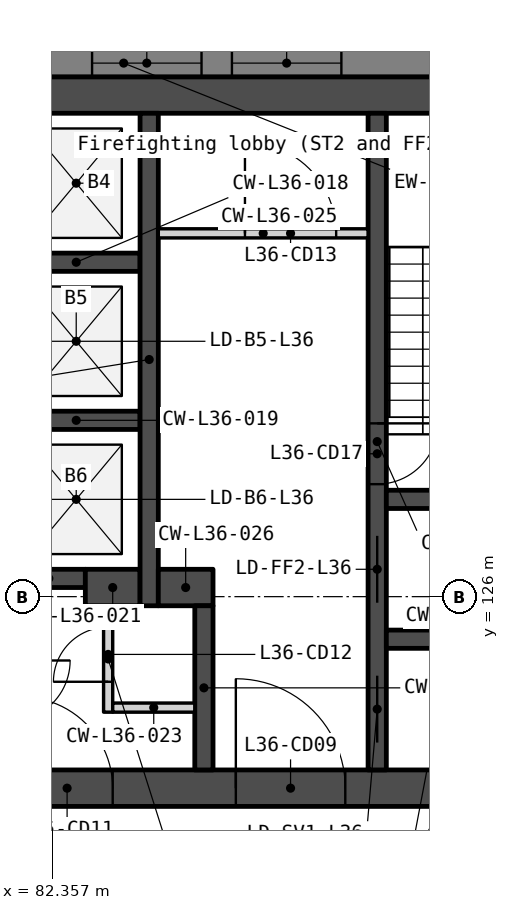
"""IFC4 building model, lengths in metres.
Left out: names, types, materials, properties, quantities, classifications, styles, units other than length and angle.
Written with IfcOpenShell. Run it as: python <this file> out.ifc"""

import sys

from ifc_helpers import new_model, si_unit, direction, frame, frame_2d, origin, place, context, subcontext, project, spatial, polyline, rectangle, outline, extrude, element, fill, save


model = new_model("IFC4")
c1 = context("Model", 3, precision=1e-05, world=origin(), true_north=direction((0.0, 1.0)))
c2 = subcontext(c1, "Body", "Model", "MODEL_VIEW")
j1 = project(units=[si_unit("LENGTHUNIT", "METRE"), si_unit("PLANEANGLEUNIT", "RADIAN")], contexts=[c1])
p1 = place(None, origin())
s1 = spatial("IfcSite", under=j1, at=p1, CompositionType="ELEMENT")
p2 = place(p1, origin())
s2 = spatial("IfcBuilding", under=s1, at=p2, CompositionType="ELEMENT")
p3 = place(p2, frame((0.0, 0.0, 144.2)))
s3 = spatial("IfcBuildingStorey", under=s2, at=p3, CompositionType="ELEMENT", Elevation=144.2)
p4 = place(p3, frame((69.0, 134.25, 0.0), z_axis=(0.0, 0.0, 1.0), x_axis=(1.0, 0.0, 0.0)))
e1 = element("IfcWall", 1, at=p4, inside=s3, PredefinedType="SOLIDWALL", context=c2, shape_type="SweptSolid", body=[
    extrude(rectangle(XDim=22.0, YDim=0.6, at=frame_2d((11.0, 0.0))), origin(), (0.0, 0.0, 1.0), 3.75),
])
p5 = place(p3, frame((69.0, 122.85, 0.0), z_axis=(0.0, 0.0, 1.0), x_axis=(1.0, 0.0, 0.0)))
e2 = element("IfcWall", 2, at=p5, inside=s3, PredefinedType="SOLIDWALL", context=c2, shape_type="SweptSolid", body=[
    extrude(rectangle(XDim=22.0, YDim=0.6, at=frame_2d((11.0, 0.0))), origin(), (0.0, 0.0, 1.0), 3.75),
])
p6 = place(p5, frame((16.375, 0.0, 0.0)))
e3 = element("IfcOpeningElement", 3, at=p6, cuts=e2, PredefinedType="OPENING", context=c2, shape_type="SweptSolid", body=[
    extrude(rectangle(XDim=1.8, YDim=2.1, at=frame_2d((0.9, 1.05))), frame((0.0, 0.31, 0.0), z_axis=(0.0, -1.0, 0.0), x_axis=(1.0, 0.0, 0.0)), (0.0, 0.0, 1.0), 0.62),
])
p7 = place(p5, frame((3.825, 0.0, 0.0)))
e4 = element("IfcOpeningElement", 4, at=p7, cuts=e2, PredefinedType="OPENING", context=c2, shape_type="SweptSolid", body=[
    extrude(rectangle(XDim=1.8, YDim=2.1, at=frame_2d((0.9, 1.05))), frame((0.0, 0.31, 0.0), z_axis=(0.0, -1.0, 0.0), x_axis=(1.0, 0.0, 0.0)), (0.0, 0.0, 1.0), 0.62),
])
p8 = place(p5, frame((12.85, 0.0, 0.0)))
e5 = element("IfcOpeningElement", 5, at=p8, cuts=e2, PredefinedType="OPENING", context=c2, shape_type="SweptSolid", body=[
    extrude(rectangle(XDim=1.5, YDim=2.1, at=frame_2d((0.75, 1.05))), frame((0.0, 0.31, 0.0), z_axis=(0.0, -1.0, 0.0), x_axis=(1.0, 0.0, 0.0)), (0.0, 0.0, 1.0), 0.62),
])
for number, where, z_axis, x_axis in (
    (6, (81.7, 131.5, 0.0), (0.0, 0.0, 1.0), (1.0, 0.0, 0.0)),
    (7, (81.7, 128.9, 0.0), (0.0, 0.0, 1.0), (1.0, 0.0, 0.0)),
):
    element("IfcWall", number, at=place(p3, frame(where, z_axis=z_axis, x_axis=x_axis)), inside=s3, PredefinedType="SOLIDWALL", context=c2, shape_type="SweptSolid", body=[
        extrude(rectangle(XDim=2.1, YDim=0.3, at=frame_2d((1.05, 0.0))), origin(), (0.0, 0.0, 1.0), 3.75),
    ])
p9 = place(p3, frame((81.7, 126.3, 0.0), z_axis=(0.0, 0.0, 1.0), x_axis=(1.0, 0.0, 0.0)))
e8 = element("IfcWall", 8, at=p9, inside=s3, PredefinedType="SOLIDWALL", context=c2, shape_type="SweptSolid", body=[
    extrude(rectangle(XDim=1.2, YDim=0.3, at=frame_2d((0.6, 0.0))), origin(), (0.0, 0.0, 1.0), 3.75),
])
p10 = place(p3, frame((82.9, 126.15, 0.0), z_axis=(0.0, 0.0, 1.0), x_axis=(1.0, 0.0, 0.0)))
e9 = element("IfcWall", 9, at=p10, inside=s3, PredefinedType="SOLIDWALL", context=c2, shape_type="SweptSolid", body=[
    extrude(rectangle(XDim=0.9, YDim=0.6, at=frame_2d((0.45, 0.0))), origin(), (0.0, 0.0, 1.0), 3.75),
])
p11 = place(p3, frame((83.275, 125.85, 0.0), z_axis=(0.0, 0.0, 1.0), x_axis=(0.0, -1.0, 0.0)))
e10 = element("IfcWall", 10, at=p11, inside=s3, PredefinedType="PARTITIONING", context=c2, shape_type="SweptSolid", body=[
    extrude(rectangle(XDim=1.75, YDim=0.15, at=frame_2d((0.875, 0.0))), origin(), (0.0, 0.0, 1.0), 3.75),
])
p12 = place(p11, frame((0.35, 0.0, 0.0)))
e11 = element("IfcOpeningElement", 11, at=p12, cuts=e10, PredefinedType="OPENING", context=c2, shape_type="SweptSolid", body=[
    extrude(rectangle(XDim=0.9, YDim=2.1, at=frame_2d((0.45, 1.05))), frame((0.0, 0.085, 0.0), z_axis=(0.0, -1.0, 0.0), x_axis=(1.0, 0.0, 0.0)), (0.0, 0.0, 1.0), 0.17),
])
p13 = place(p3, frame((83.35, 124.175, 0.0), z_axis=(0.0, 0.0, 1.0), x_axis=(1.0, 0.0, 0.0)))
e12 = element("IfcWall", 12, at=p13, inside=s3, PredefinedType="PARTITIONING", context=c2, shape_type="SweptSolid", body=[
    extrude(rectangle(XDim=1.35, YDim=0.15, at=frame_2d((0.675, 0.0))), origin(), (0.0, 0.0, 1.0), 3.75),
])
p14 = place(p3, frame((83.95, 133.95, 0.0), z_axis=(0.0, 0.0, 1.0), x_axis=(0.0, -1.0, 0.0)))
e13 = element("IfcWall", 13, at=p14, inside=s3, PredefinedType="SOLIDWALL", context=c2, shape_type="SweptSolid", body=[
    extrude(rectangle(XDim=8.1, YDim=0.3, at=frame_2d((4.05, 0.0))), origin(), (0.0, 0.0, 1.0), 3.75),
])
p15 = place(p3, frame((84.1, 131.975, 0.0), z_axis=(0.0, 0.0, 1.0), x_axis=(1.0, 0.0, 0.0)))
e14 = element("IfcWall", 14, at=p15, inside=s3, PredefinedType="PARTITIONING", context=c2, shape_type="SweptSolid", body=[
    extrude(rectangle(XDim=3.45, YDim=0.15, at=frame_2d((1.725, 0.0))), origin(), (0.0, 0.0, 1.0), 3.75),
])
p16 = place(p15, frame((1.425, 0.0, 0.0)))
e15 = element("IfcOpeningElement", 15, at=p16, cuts=e14, PredefinedType="OPENING", context=c2, shape_type="SweptSolid", body=[
    extrude(rectangle(XDim=1.5, YDim=2.1, at=frame_2d((0.75, 1.05))), frame((0.0, 0.085, 0.0), z_axis=(0.0, -1.0, 0.0), x_axis=(1.0, 0.0, 0.0)), (0.0, 0.0, 1.0), 0.17),
])
p17 = place(p3, frame((84.1, 126.15, 0.0), z_axis=(0.0, 0.0, 1.0), x_axis=(1.0, 0.0, 0.0)))
e16 = element("IfcWall", 16, at=p17, inside=s3, PredefinedType="SOLIDWALL", context=c2, shape_type="SweptSolid", body=[
    extrude(rectangle(XDim=0.9, YDim=0.6, at=frame_2d((0.45, 0.0))), origin(), (0.0, 0.0, 1.0), 3.75),
])
p18 = place(p3, frame((84.85, 125.85, 0.0), z_axis=(0.0, 0.0, 1.0), x_axis=(0.0, -1.0, 0.0)))
e17 = element("IfcWall", 17, at=p18, inside=s3, PredefinedType="SOLIDWALL", context=c2, shape_type="SweptSolid", body=[
    extrude(rectangle(XDim=2.7, YDim=0.3, at=frame_2d((1.35, 0.0))), origin(), (0.0, 0.0, 1.0), 3.75),
])
p19 = place(p3, frame((87.7, 133.95, 0.0), z_axis=(0.0, 0.0, 1.0), x_axis=(0.0, -1.0, 0.0)))
e18 = element("IfcWall", 18, at=p19, inside=s3, PredefinedType="SOLIDWALL", context=c2, shape_type="SweptSolid", body=[
    extrude(rectangle(XDim=10.8, YDim=0.3, at=frame_2d((5.4, 0.0))), origin(), (0.0, 0.0, 1.0), 3.75),
])
p20 = place(p19, frame((6.95, 0.0, 0.0)))
e19 = element("IfcOpeningElement", 19, at=p20, cuts=e18, PredefinedType="OPENING", context=c2, shape_type="SweptSolid", body=[
    extrude(rectangle(XDim=1.1, YDim=2.1, at=frame_2d((0.55, 1.05))), frame((0.0, 0.16, 0.0), z_axis=(0.0, -1.0, 0.0), x_axis=(1.0, 0.0, 0.0)), (0.0, 0.0, 1.0), 0.32),
])
p21 = place(p19, frame((5.1, 0.0, 0.0)))
e20 = element("IfcOpeningElement", 20, at=p21, cuts=e18, PredefinedType="OPENING", context=c2, shape_type="SweptSolid", body=[
    extrude(rectangle(XDim=1.0, YDim=2.1, at=frame_2d((0.5, 1.05))), frame((0.0, 0.16, 0.0), z_axis=(0.0, -1.0, 0.0), x_axis=(1.0, 0.0, 0.0)), (0.0, 0.0, 1.0), 0.32),
])
p22 = place(p19, frame((9.25, 0.0, 0.0)))
e21 = element("IfcOpeningElement", 21, at=p22, cuts=e18, PredefinedType="OPENING", context=c2, shape_type="SweptSolid", body=[
    extrude(rectangle(XDim=1.1, YDim=2.1, at=frame_2d((0.55, 1.05))), frame((0.0, 0.16, 0.0), z_axis=(0.0, -1.0, 0.0), x_axis=(1.0, 0.0, 0.0)), (0.0, 0.0, 1.0), 0.32),
])
for number, where, z_axis, x_axis in (
    (22, (87.85, 127.6, 0.0), (0.0, 0.0, 1.0), (1.0, 0.0, 0.0)),
    (23, (87.85, 125.3, 0.0), (0.0, 0.0, 1.0), (1.0, 0.0, 0.0)),
):
    element("IfcWall", number, at=place(p3, frame(where, z_axis=z_axis, x_axis=x_axis)), inside=s3, PredefinedType="SOLIDWALL", context=c2, shape_type="SweptSolid", body=[
        extrude(rectangle(XDim=2.55, YDim=0.3, at=frame_2d((1.275, 0.0))), origin(), (0.0, 0.0, 1.0), 3.75),
    ])
p23 = place(p3, frame((100.243, 134.775, -0.15), z_axis=(0.0, 0.0, 1.0), x_axis=(-1.0, 0.0, 0.0)))
e24 = element("IfcWall", 24, at=p23, inside=s3, PredefinedType="SOLIDWALL", context=c2, shape_type="SweptSolid", body=[
    extrude(outline(polyline([(0.0, 0.0), (0.0, 3.9), (33.425, 3.9), (33.425, 0.0), (0.0, 0.0)])), frame((0.0, 0.225, 0.0), z_axis=(0.0, -1.0, 0.0), x_axis=(1.0, 0.0, 0.0)), (0.0, 0.0, 1.0), 0.45),
])
p24 = place(p23, frame((3.011, 0.0, 0.95)))
e25 = element("IfcOpeningElement", 25, at=p24, cuts=e24, PredefinedType="OPENING", context=c2, shape_type="SweptSolid", body=[
    extrude(rectangle(XDim=1.8, YDim=2.2, at=frame_2d((0.9, 1.1))), frame((0.0, 0.235, 0.0), z_axis=(0.0, -1.0, 0.0), x_axis=(1.0, 0.0, 0.0)), (0.0, 0.0, 1.0), 0.47),
])
p25 = place(p23, frame((5.311, 0.0, 0.95)))
e26 = element("IfcOpeningElement", 26, at=p25, cuts=e24, PredefinedType="OPENING", context=c2, shape_type="SweptSolid", body=[
    extrude(rectangle(XDim=1.8, YDim=2.2, at=frame_2d((0.9, 1.1))), frame((0.0, 0.235, 0.0), z_axis=(0.0, -1.0, 0.0), x_axis=(1.0, 0.0, 0.0)), (0.0, 0.0, 1.0), 0.47),
])
p26 = place(p23, frame((13.132, 0.0, 0.95)))
e27 = element("IfcOpeningElement", 27, at=p26, cuts=e24, PredefinedType="OPENING", context=c2, shape_type="SweptSolid", body=[
    extrude(rectangle(XDim=1.8, YDim=2.2, at=frame_2d((0.9, 1.1))), frame((0.0, 0.235, 0.0), z_axis=(0.0, -1.0, 0.0), x_axis=(1.0, 0.0, 0.0)), (0.0, 0.0, 1.0), 0.47),
])
p27 = place(p23, frame((15.432, 0.0, 0.95)))
e28 = element("IfcOpeningElement", 28, at=p27, cuts=e24, PredefinedType="OPENING", context=c2, shape_type="SweptSolid", body=[
    extrude(rectangle(XDim=1.8, YDim=2.2, at=frame_2d((0.9, 1.1))), frame((0.0, 0.235, 0.0), z_axis=(0.0, -1.0, 0.0), x_axis=(1.0, 0.0, 0.0)), (0.0, 0.0, 1.0), 0.47),
])
p28 = place(p23, frame((23.254, 0.0, 0.95)))
e29 = element("IfcOpeningElement", 29, at=p28, cuts=e24, PredefinedType="OPENING", context=c2, shape_type="SweptSolid", body=[
    extrude(rectangle(XDim=1.8, YDim=2.2, at=frame_2d((0.9, 1.1))), frame((0.0, 0.235, 0.0), z_axis=(0.0, -1.0, 0.0), x_axis=(1.0, 0.0, 0.0)), (0.0, 0.0, 1.0), 0.47),
])
p29 = place(p23, frame((25.554, 0.0, 0.95)))
e30 = element("IfcOpeningElement", 30, at=p29, cuts=e24, PredefinedType="OPENING", context=c2, shape_type="SweptSolid", body=[
    extrude(rectangle(XDim=1.8, YDim=2.2, at=frame_2d((0.9, 1.1))), frame((0.0, 0.235, 0.0), z_axis=(0.0, -1.0, 0.0), x_axis=(1.0, 0.0, 0.0)), (0.0, 0.0, 1.0), 0.47),
])
p30 = place(p3, frame((82.105, 96.067, -0.15), z_axis=(0.0, 0.0, 1.0), x_axis=(0.499997369791, 0.866026922331, 0.0)))
e31 = element("IfcWall", 31, at=p30, inside=s3, PredefinedType="SOLIDWALL", context=c2, shape_type="SweptSolid", body=[
    extrude(outline(polyline([(40.486, 0.0), (40.486, 3.9), (0.0, 3.9), (0.0, 0.0), (40.486, 0.0)])), frame((0.0, 0.225, 0.0), z_axis=(0.0, -1.0, 0.0), x_axis=(1.0, 0.0, 0.0)), (0.0, 0.0, 1.0), 0.45),
])
p31 = place(p30, frame((3.011, 0.0, 0.95)))
e32 = element("IfcOpeningElement", 32, at=p31, cuts=e31, PredefinedType="OPENING", context=c2, shape_type="SweptSolid", body=[
    extrude(rectangle(XDim=1.8, YDim=2.2, at=frame_2d((0.9, 1.1))), frame((0.0, 0.235, 0.0), z_axis=(0.0, -1.0, 0.0), x_axis=(1.0, 0.0, 0.0)), (0.0, 0.0, 1.0), 0.47),
])
p32 = place(p30, frame((5.311, 0.0, 0.95)))
e33 = element("IfcOpeningElement", 33, at=p32, cuts=e31, PredefinedType="OPENING", context=c2, shape_type="SweptSolid", body=[
    extrude(rectangle(XDim=1.8, YDim=2.2, at=frame_2d((0.9, 1.1))), frame((0.0, 0.235, 0.0), z_axis=(0.0, -1.0, 0.0), x_axis=(1.0, 0.0, 0.0)), (0.0, 0.0, 1.0), 0.47),
])
p33 = place(p30, frame((13.132, 0.0, 0.95)))
e34 = element("IfcOpeningElement", 34, at=p33, cuts=e31, PredefinedType="OPENING", context=c2, shape_type="SweptSolid", body=[
    extrude(rectangle(XDim=1.8, YDim=2.2, at=frame_2d((0.9, 1.1))), frame((0.0, 0.235, 0.0), z_axis=(0.0, -1.0, 0.0), x_axis=(1.0, 0.0, 0.0)), (0.0, 0.0, 1.0), 0.47),
])
p34 = place(p30, frame((15.432, 0.0, 0.95)))
e35 = element("IfcOpeningElement", 35, at=p34, cuts=e31, PredefinedType="OPENING", context=c2, shape_type="SweptSolid", body=[
    extrude(rectangle(XDim=1.8, YDim=2.2, at=frame_2d((0.9, 1.1))), frame((0.0, 0.235, 0.0), z_axis=(0.0, -1.0, 0.0), x_axis=(1.0, 0.0, 0.0)), (0.0, 0.0, 1.0), 0.47),
])
p35 = place(p30, frame((23.254, 0.0, 0.95)))
e36 = element("IfcOpeningElement", 36, at=p35, cuts=e31, PredefinedType="OPENING", context=c2, shape_type="SweptSolid", body=[
    extrude(rectangle(XDim=1.8, YDim=2.2, at=frame_2d((0.9, 1.1))), frame((0.0, 0.235, 0.0), z_axis=(0.0, -1.0, 0.0), x_axis=(1.0, 0.0, 0.0)), (0.0, 0.0, 1.0), 0.47),
])
p36 = place(p30, frame((25.554, 0.0, 0.95)))
e37 = element("IfcOpeningElement", 37, at=p36, cuts=e31, PredefinedType="OPENING", context=c2, shape_type="SweptSolid", body=[
    extrude(rectangle(XDim=1.8, YDim=2.2, at=frame_2d((0.9, 1.1))), frame((0.0, 0.235, 0.0), z_axis=(0.0, -1.0, 0.0), x_axis=(1.0, 0.0, 0.0)), (0.0, 0.0, 1.0), 0.47),
])
p37 = place(p30, frame((33.375, 0.0, 0.95)))
e38 = element("IfcOpeningElement", 38, at=p37, cuts=e31, PredefinedType="OPENING", context=c2, shape_type="SweptSolid", body=[
    extrude(rectangle(XDim=1.8, YDim=2.2, at=frame_2d((0.9, 1.1))), frame((0.0, 0.235, 0.0), z_axis=(0.0, -1.0, 0.0), x_axis=(1.0, 0.0, 0.0)), (0.0, 0.0, 1.0), 0.47),
])
p38 = place(p30, frame((35.675, 0.0, 0.95)))
e39 = element("IfcOpeningElement", 39, at=p38, cuts=e31, PredefinedType="OPENING", context=c2, shape_type="SweptSolid", body=[
    extrude(rectangle(XDim=1.8, YDim=2.2, at=frame_2d((0.9, 1.1))), frame((0.0, 0.235, 0.0), z_axis=(0.0, -1.0, 0.0), x_axis=(1.0, 0.0, 0.0)), (0.0, 0.0, 1.0), 0.47),
])
p39 = place(p3, frame((87.465, 120.1, 0.0), z_axis=(0.0, 0.0, 1.0), x_axis=(0.499991416419, 0.86603035946, 0.0)))
e40 = element("IfcWall", 40, at=p39, inside=s3, PredefinedType="PARTITIONING", context=c2, shape_type="SweptSolid", body=[
    extrude(rectangle(XDim=2.829, YDim=0.15, at=frame_2d((1.414, 0.0))), origin(), (0.0, 0.0, 1.0), 3.75),
])
p40 = place(p39, frame((0.914, 0.0, 0.0)))
e41 = element("IfcOpeningElement", 41, at=p40, cuts=e40, PredefinedType="OPENING", context=c2, shape_type="SweptSolid", body=[
    extrude(rectangle(XDim=1.0, YDim=2.1, at=frame_2d((0.5, 1.05))), frame((0.0, 0.085, 0.0), z_axis=(0.0, -1.0, 0.0), x_axis=(1.0, 0.0, 0.0)), (0.0, 0.0, 1.0), 0.17),
])
p41 = place(p20, origin())
e42 = element("IfcDoor", 42, at=p41, inside=s3, OperationType="SLIDING_TO_LEFT", PredefinedType="DOOR", context=c2, shape_type="SweptSolid", body=[
    extrude(rectangle(XDim=1.1, YDim=2.1, at=frame_2d((0.55, 1.05))), frame((0.0, 0.025, 0.0), z_axis=(0.0, -1.0, 0.0), x_axis=(1.0, 0.0, 0.0)), (0.0, 0.0, 1.0), 0.05),
])
fill(e19, e42)
p42 = place(p6, origin())
e43 = element("IfcDoor", 43, at=p42, inside=s3, OperationType="DOUBLE_DOOR_DOUBLE_SWING", PredefinedType="DOOR", context=c2, shape_type="SweptSolid", body=[
    extrude(rectangle(XDim=1.8, YDim=2.1, at=frame_2d((0.9, 1.05))), frame((0.0, 0.025, 0.0), z_axis=(0.0, -1.0, 0.0), x_axis=(1.0, 0.0, 0.0)), (0.0, 0.0, 1.0), 0.05),
])
fill(e3, e43)
p43 = place(p8, origin())
e44 = element("IfcDoor", 44, at=p43, inside=s3, OperationType="DOUBLE_DOOR_DOUBLE_SWING", PredefinedType="DOOR", context=c2, shape_type="SweptSolid", body=[
    extrude(rectangle(XDim=1.5, YDim=2.1, at=frame_2d((0.75, 1.05))), frame((0.0, 0.025, 0.0), z_axis=(0.0, -1.0, 0.0), x_axis=(1.0, 0.0, 0.0)), (0.0, 0.0, 1.0), 0.05),
])
fill(e5, e44)
p44 = place(p12, origin())
e45 = element("IfcDoor", 45, at=p44, inside=s3, OperationType="SINGLE_SWING_RIGHT", PredefinedType="DOOR", context=c2, shape_type="SweptSolid", body=[
    extrude(rectangle(XDim=0.9, YDim=2.1, at=frame_2d((0.45, 1.05))), frame((0.0, 0.025, 0.0), z_axis=(0.0, -1.0, 0.0), x_axis=(1.0, 0.0, 0.0)), (0.0, 0.0, 1.0), 0.05),
])
fill(e11, e45)
p45 = place(p16, origin())
e46 = element("IfcDoor", 46, at=p45, inside=s3, OperationType="DOUBLE_DOOR_DOUBLE_SWING", PredefinedType="DOOR", context=c2, shape_type="SweptSolid", body=[
    extrude(rectangle(XDim=1.5, YDim=2.1, at=frame_2d((0.75, 1.05))), frame((0.0, 0.025, 0.0), z_axis=(0.0, -1.0, 0.0), x_axis=(1.0, 0.0, 0.0)), (0.0, 0.0, 1.0), 0.05),
])
fill(e15, e46)
p46 = place(p21, origin())
e47 = element("IfcDoor", 47, at=p46, inside=s3, OperationType="SINGLE_SWING_LEFT", PredefinedType="DOOR", context=c2, shape_type="SweptSolid", body=[
    extrude(rectangle(XDim=1.0, YDim=2.1, at=frame_2d((0.5, 1.05))), frame((0.0, 0.025, 0.0), z_axis=(0.0, -1.0, 0.0), x_axis=(1.0, 0.0, 0.0)), (0.0, 0.0, 1.0), 0.05),
])
fill(e20, e47)
p47 = place(p22, origin())
e48 = element("IfcDoor", 48, at=p47, inside=s3, OperationType="SLIDING_TO_LEFT", PredefinedType="DOOR", context=c2, shape_type="SweptSolid", body=[
    extrude(rectangle(XDim=1.1, YDim=2.1, at=frame_2d((0.55, 1.05))), frame((0.0, 0.025, 0.0), z_axis=(0.0, -1.0, 0.0), x_axis=(1.0, 0.0, 0.0)), (0.0, 0.0, 1.0), 0.05),
])
fill(e21, e48)
p48 = place(p26, origin())
e49 = element("IfcWindow", 49, at=p48, inside=s3, PartitioningType="SINGLE_PANEL", PredefinedType="WINDOW", context=c2, shape_type="SweptSolid", body=[
    extrude(rectangle(XDim=1.8, YDim=2.2, at=frame_2d((0.9, 1.1))), frame((0.0, 0.03, 0.0), z_axis=(0.0, -1.0, 0.0), x_axis=(1.0, 0.0, 0.0)), (0.0, 0.0, 1.0), 0.06),
])
fill(e27, e49)
p49 = place(p27, origin())
e50 = element("IfcWindow", 50, at=p49, inside=s3, PartitioningType="SINGLE_PANEL", PredefinedType="WINDOW", context=c2, shape_type="SweptSolid", body=[
    extrude(rectangle(XDim=1.8, YDim=2.2, at=frame_2d((0.9, 1.1))), frame((0.0, 0.03, 0.0), z_axis=(0.0, -1.0, 0.0), x_axis=(1.0, 0.0, 0.0)), (0.0, 0.0, 1.0), 0.06),
])
fill(e28, e50)
save(model, sys.argv[1])
